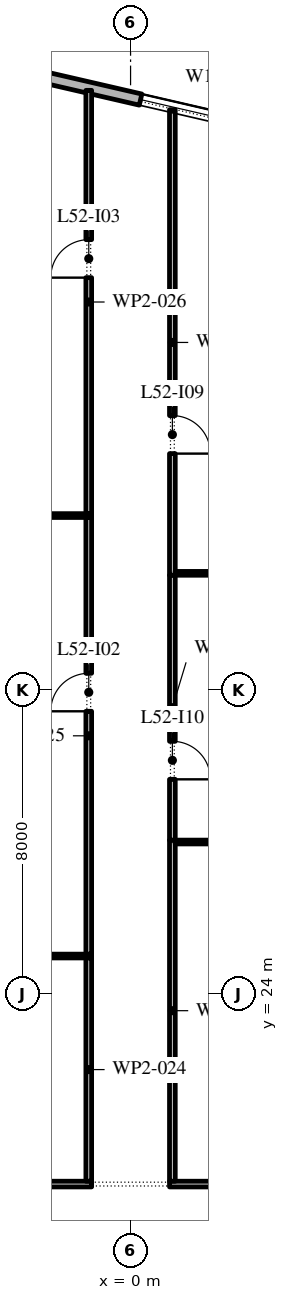
"""IFC4 building model, lengths in metres.
Left out: names, types, materials, properties, quantities, classifications, styles, units other than length and angle.
Written with IfcOpenShell. Run it as: python <this file> out.ifc"""

import sys

from ifc_helpers import new_model, si_unit, direction, frame, frame_2d, origin, place, context, subcontext, project, spatial, rectangle, extrude, element, fill, save


model = new_model("IFC4")
c1 = context("Model", 3, precision=1e-05, world=origin(), true_north=direction((0.0, 1.0)))
c2 = subcontext(c1, "Body", "Model", "MODEL_VIEW")
j1 = project(units=[si_unit("LENGTHUNIT", "METRE"), si_unit("PLANEANGLEUNIT", "RADIAN")], contexts=[c1])
p1 = place(None, origin())
s1 = spatial("IfcSite", under=j1, at=p1, CompositionType="ELEMENT")
p2 = place(p1, origin())
s2 = spatial("IfcBuilding", under=s1, at=p2, CompositionType="ELEMENT")
p3 = place(p2, frame((0.0, 0.0, 243.0)))
s3 = spatial("IfcBuildingStorey", under=s2, at=p3, CompositionType="ELEMENT", Elevation=243.0)
p4 = place(p3, frame((29.616, 40.758, 0.0), z_axis=(0.0, 0.0, 1.0), x_axis=(-0.974370532314, 0.224949029246, 0.0)))
e1 = element("IfcWall", 1, at=p4, inside=s3, PredefinedType="STANDARD", context=c2, shape_type="SweptSolid", body=[
    extrude(rectangle(XDim=48.0, YDim=0.3, at=frame_2d((24.0, 0.0))), origin(), (0.0, 0.0, 1.0), 4.0),
])
p5 = place(p4, frame((1.625, 0.0, 0.45)))
e2 = element("IfcOpeningElement", 2, at=p5, cuts=e1, PredefinedType="OPENING", context=c2, shape_type="SweptSolid", body=[
    extrude(rectangle(XDim=4.5, YDim=2.675, at=frame_2d((2.25, 1.337))), frame((0.0, 0.16, 0.0), z_axis=(0.0, -1.0, 0.0), x_axis=(1.0, 0.0, 0.0)), (0.0, 0.0, 1.0), 0.32),
])
p6 = place(p4, frame((9.975, 0.0, 0.0)))
e3 = element("IfcOpeningElement", 3, at=p6, cuts=e1, PredefinedType="OPENING", context=c2, shape_type="SweptSolid", body=[
    extrude(rectangle(XDim=2.4, YDim=3.5, at=frame_2d((1.2, 1.75))), frame((0.0, 0.16, 0.0), z_axis=(0.0, -1.0, 0.0), x_axis=(1.0, 0.0, 0.0)), (0.0, 0.0, 1.0), 0.32),
])
p7 = place(p4, frame((17.575, 0.0, 0.45)))
e4 = element("IfcOpeningElement", 4, at=p7, cuts=e1, PredefinedType="OPENING", context=c2, shape_type="SweptSolid", body=[
    extrude(rectangle(XDim=4.5, YDim=2.575, at=frame_2d((2.25, 1.288))), frame((0.0, 0.16, 0.0), z_axis=(0.0, -1.0, 0.0), x_axis=(1.0, 0.0, 0.0)), (0.0, 0.0, 1.0), 0.32),
])
p8 = place(p4, frame((25.625, 0.0, 0.45)))
e5 = element("IfcOpeningElement", 5, at=p8, cuts=e1, PredefinedType="OPENING", context=c2, shape_type="SweptSolid", body=[
    extrude(rectangle(XDim=4.5, YDim=2.45, at=frame_2d((2.25, 1.225))), frame((0.0, 0.16, 0.0), z_axis=(0.0, -1.0, 0.0), x_axis=(1.0, 0.0, 0.0)), (0.0, 0.0, 1.0), 0.32),
])
p9 = place(p4, frame((33.675, 0.0, 0.45)))
e6 = element("IfcOpeningElement", 6, at=p9, cuts=e1, PredefinedType="OPENING", context=c2, shape_type="SweptSolid", body=[
    extrude(rectangle(XDim=4.5, YDim=2.45, at=frame_2d((2.25, 1.225))), frame((0.0, 0.16, 0.0), z_axis=(0.0, -1.0, 0.0), x_axis=(1.0, 0.0, 0.0)), (0.0, 0.0, 1.0), 0.32),
])
p10 = place(p4, frame((42.775, 0.0, 0.0)))
e7 = element("IfcOpeningElement", 7, at=p10, cuts=e1, PredefinedType="OPENING", context=c2, shape_type="SweptSolid", body=[
    extrude(rectangle(XDim=2.4, YDim=3.5, at=frame_2d((1.2, 1.75))), frame((0.0, 0.16, 0.0), z_axis=(0.0, -1.0, 0.0), x_axis=(1.0, 0.0, 0.0)), (0.0, 0.0, 1.0), 0.32),
])
p11 = place(p3, frame((-9.29, 36.59, 0.0), z_axis=(0.0, 0.0, 1.0), x_axis=(1.0, 0.0, 0.0)))
e8 = element("IfcWall", 8, at=p11, inside=s3, PredefinedType="PARTITIONING", context=c2, shape_type="SweptSolid", body=[
    extrude(rectangle(XDim=8.265, YDim=0.1, at=frame_2d((4.133, 0.0))), origin(), (0.0, 0.0, 1.0), 4.0),
])
p12 = place(p3, frame((-8.075, 19.0, 0.0), z_axis=(0.0, 0.0, 1.0), x_axis=(1.0, 0.0, 0.0)))
e9 = element("IfcWall", 9, at=p12, inside=s3, PredefinedType="PARTITIONING", context=c2, shape_type="SweptSolid", body=[
    extrude(rectangle(XDim=7.05, YDim=0.15, at=frame_2d((3.525, 0.0))), origin(), (0.0, 0.0, 1.0), 4.0),
])
p13 = place(p12, frame((3.075, 0.0, 0.0)))
e10 = element("IfcOpeningElement", 10, at=p13, cuts=e9, PredefinedType="OPENING", context=c2, shape_type="SweptSolid", body=[
    extrude(rectangle(XDim=1.0, YDim=2.1, at=frame_2d((0.5, 1.05))), frame((0.0, 0.085, 0.0), z_axis=(0.0, -1.0, 0.0), x_axis=(1.0, 0.0, 0.0)), (0.0, 0.0, 1.0), 0.17),
])
p14 = place(p3, frame((-7.925, 25.0, 0.0), z_axis=(0.0, 0.0, 1.0), x_axis=(1.0, 0.0, 0.0)))
e11 = element("IfcWall", 11, at=p14, inside=s3, PredefinedType="PARTITIONING", context=c2, shape_type="SweptSolid", body=[
    extrude(rectangle(XDim=6.9, YDim=0.1, at=frame_2d((3.45, 0.0))), origin(), (0.0, 0.0, 1.0), 4.0),
])
p15 = place(p3, frame((-1.1, 19.075, 0.0), z_axis=(0.0, 0.0, 1.0), x_axis=(0.0, 1.0, 0.0)))
e12 = element("IfcWall", 12, at=p15, inside=s3, PredefinedType="PARTITIONING", context=c2, shape_type="SweptSolid", body=[
    extrude(rectangle(XDim=5.875, YDim=0.15, at=frame_2d((2.938, 0.0))), origin(), (0.0, 0.0, 1.0), 4.0),
])
p16 = place(p3, frame((-1.1, 25.05, 0.0), z_axis=(0.0, 0.0, 1.0), x_axis=(0.0, 1.0, 0.0)))
e13 = element("IfcWall", 13, at=p16, inside=s3, PredefinedType="PARTITIONING", context=c2, shape_type="SweptSolid", body=[
    extrude(rectangle(XDim=11.49, YDim=0.15, at=frame_2d((5.745, 0.0))), origin(), (0.0, 0.0, 1.0), 4.0),
])
p17 = place(p16, frame((6.39, 0.0, 0.0)))
e14 = element("IfcOpeningElement", 14, at=p17, cuts=e13, PredefinedType="OPENING", context=c2, shape_type="SweptSolid", body=[
    extrude(rectangle(XDim=1.0, YDim=2.1, at=frame_2d((0.5, 1.05))), frame((0.0, 0.085, 0.0), z_axis=(0.0, -1.0, 0.0), x_axis=(1.0, 0.0, 0.0)), (0.0, 0.0, 1.0), 0.17),
])
p18 = place(p3, frame((-1.1, 36.64, 0.0), z_axis=(0.0, 0.0, 1.0), x_axis=(0.0, 1.0, 0.0)))
e15 = element("IfcWall", 15, at=p18, inside=s3, PredefinedType="PARTITIONING", context=c2, shape_type="SweptSolid", body=[
    extrude(rectangle(XDim=11.138, YDim=0.15, at=frame_2d((5.569, 0.0))), origin(), (0.0, 0.0, 1.0), 4.0),
])
p19 = place(p18, frame((6.21, 0.0, 0.0)))
e16 = element("IfcOpeningElement", 16, at=p19, cuts=e15, PredefinedType="OPENING", context=c2, shape_type="SweptSolid", body=[
    extrude(rectangle(XDim=1.0, YDim=2.1, at=frame_2d((0.5, 1.05))), frame((0.0, 0.085, 0.0), z_axis=(0.0, -1.0, 0.0), x_axis=(1.0, 0.0, 0.0)), (0.0, 0.0, 1.0), 0.17),
])
p20 = place(p3, frame((1.025, 19.0, 0.0), z_axis=(0.0, 0.0, 1.0), x_axis=(1.0, 0.0, 0.0)))
e17 = element("IfcWall", 17, at=p20, inside=s3, PredefinedType="PARTITIONING", context=c2, shape_type="SweptSolid", body=[
    extrude(rectangle(XDim=7.05, YDim=0.15, at=frame_2d((3.525, 0.0))), origin(), (0.0, 0.0, 1.0), 4.0),
])
p21 = place(p3, frame((1.1, 28.05, 0.0), z_axis=(0.0, 0.0, 1.0), x_axis=(0.0, -1.0, 0.0)))
e18 = element("IfcWall", 18, at=p21, inside=s3, PredefinedType="PARTITIONING", context=c2, shape_type="SweptSolid", body=[
    extrude(rectangle(XDim=8.975, YDim=0.15, at=frame_2d((4.488, 0.0))), origin(), (0.0, 0.0, 1.0), 4.0),
])
p22 = place(p3, frame((1.175, 28.0, 0.0), z_axis=(0.0, 0.0, 1.0), x_axis=(1.0, 0.0, 0.0)))
e19 = element("IfcWall", 19, at=p22, inside=s3, PredefinedType="PARTITIONING", context=c2, shape_type="SweptSolid", body=[
    extrude(rectangle(XDim=6.9, YDim=0.1, at=frame_2d((3.45, 0.0))), origin(), (0.0, 0.0, 1.0), 4.0),
])
p23 = place(p3, frame((1.1, 35.02, 0.0), z_axis=(0.0, 0.0, 1.0), x_axis=(0.0, -1.0, 0.0)))
e20 = element("IfcWall", 20, at=p23, inside=s3, PredefinedType="PARTITIONING", context=c2, shape_type="SweptSolid", body=[
    extrude(rectangle(XDim=6.97, YDim=0.15, at=frame_2d((3.485, 0.0))), origin(), (0.0, 0.0, 1.0), 4.0),
])
p24 = place(p23, frame((4.37, 0.0, 0.0)))
e21 = element("IfcOpeningElement", 21, at=p24, cuts=e20, PredefinedType="OPENING", context=c2, shape_type="SweptSolid", body=[
    extrude(rectangle(XDim=1.0, YDim=2.1, at=frame_2d((0.5, 1.05))), frame((0.0, 0.085, 0.0), z_axis=(0.0, -1.0, 0.0), x_axis=(1.0, 0.0, 0.0)), (0.0, 0.0, 1.0), 0.17),
])
p25 = place(p3, frame((1.1, 47.27, 0.0), z_axis=(0.0, 0.0, 1.0), x_axis=(0.0, -1.0, 0.0)))
e22 = element("IfcWall", 22, at=p25, inside=s3, PredefinedType="PARTITIONING", context=c2, shape_type="SweptSolid", body=[
    extrude(rectangle(XDim=12.25, YDim=0.15, at=frame_2d((6.125, 0.0))), origin(), (0.0, 0.0, 1.0), 4.0),
])
p26 = place(p25, frame((8.05, 0.0, 0.0)))
e23 = element("IfcOpeningElement", 23, at=p26, cuts=e22, PredefinedType="OPENING", context=c2, shape_type="SweptSolid", body=[
    extrude(rectangle(XDim=1.0, YDim=2.1, at=frame_2d((0.5, 1.05))), frame((0.0, 0.085, 0.0), z_axis=(0.0, -1.0, 0.0), x_axis=(1.0, 0.0, 0.0)), (0.0, 0.0, 1.0), 0.17),
])
p27 = place(p3, frame((7.935, 35.07, 0.0), z_axis=(0.0, 0.0, 1.0), x_axis=(-1.0, 0.0, 0.0)))
e24 = element("IfcWall", 24, at=p27, inside=s3, PredefinedType="PARTITIONING", context=c2, shape_type="SweptSolid", body=[
    extrude(rectangle(XDim=6.76, YDim=0.1, at=frame_2d((3.38, 0.0))), origin(), (0.0, 0.0, 1.0), 4.0),
])
p28 = place(p8, origin())
e25 = element("IfcWindow", 25, at=p28, inside=s3, PartitioningType="DOUBLE_PANEL_VERTICAL", PredefinedType="WINDOW", context=c2, shape_type="SweptSolid", body=[
    extrude(rectangle(XDim=4.5, YDim=2.45, at=frame_2d((2.25, 1.225))), frame((0.0, 0.03, 0.0), z_axis=(0.0, -1.0, 0.0), x_axis=(1.0, 0.0, 0.0)), (0.0, 0.0, 1.0), 0.06),
])
fill(e5, e25)
p29 = place(p17, origin())
e26 = element("IfcDoor", 26, at=p29, inside=s3, OperationType="SINGLE_SWING_RIGHT", PredefinedType="DOOR", context=c2, shape_type="SweptSolid", body=[
    extrude(rectangle(XDim=1.0, YDim=2.1, at=frame_2d((0.5, 1.05))), frame((0.0, 0.025, 0.0), z_axis=(0.0, -1.0, 0.0), x_axis=(1.0, 0.0, 0.0)), (0.0, 0.0, 1.0), 0.05),
])
fill(e14, e26)
p30 = place(p19, origin())
e27 = element("IfcDoor", 27, at=p30, inside=s3, OperationType="SINGLE_SWING_RIGHT", PredefinedType="DOOR", context=c2, shape_type="SweptSolid", body=[
    extrude(rectangle(XDim=1.0, YDim=2.1, at=frame_2d((0.5, 1.05))), frame((0.0, 0.025, 0.0), z_axis=(0.0, -1.0, 0.0), x_axis=(1.0, 0.0, 0.0)), (0.0, 0.0, 1.0), 0.05),
])
fill(e16, e27)
p31 = place(p26, origin())
e28 = element("IfcDoor", 28, at=p31, inside=s3, OperationType="SINGLE_SWING_LEFT", PredefinedType="DOOR", context=c2, shape_type="SweptSolid", body=[
    extrude(rectangle(XDim=1.0, YDim=2.1, at=frame_2d((0.5, 1.05))), frame((0.0, 0.025, 0.0), z_axis=(0.0, -1.0, 0.0), x_axis=(1.0, 0.0, 0.0)), (0.0, 0.0, 1.0), 0.05),
])
fill(e23, e28)
p32 = place(p24, origin())
e29 = element("IfcDoor", 29, at=p32, inside=s3, OperationType="SINGLE_SWING_LEFT", PredefinedType="DOOR", context=c2, shape_type="SweptSolid", body=[
    extrude(rectangle(XDim=1.0, YDim=2.1, at=frame_2d((0.5, 1.05))), frame((0.0, 0.025, 0.0), z_axis=(0.0, -1.0, 0.0), x_axis=(1.0, 0.0, 0.0)), (0.0, 0.0, 1.0), 0.05),
])
fill(e21, e29)
save(model, sys.argv[1])
